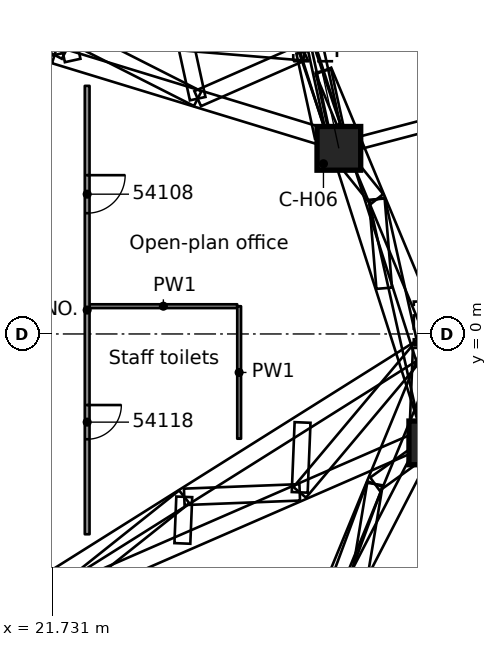
"""IFC4 building model, lengths in metres.
Left out: names, types, materials, properties, quantities, classifications, styles, units other than length and angle.
Written with IfcOpenShell. Run it as: python <this file> out.ifc"""

import sys

from ifc_helpers import new_model, si_unit, direction, frame, frame_2d, origin, origin_2d, place, context, subcontext, project, spatial, rectangle, extrude, element, fill, save


model = new_model("IFC4")
c1 = context("Model", 3, precision=1e-05, world=origin(), true_north=direction((0.0, 1.0)))
c2 = subcontext(c1, "Body", "Model", "MODEL_VIEW")
j1 = project(units=[si_unit("LENGTHUNIT", "METRE"), si_unit("PLANEANGLEUNIT", "RADIAN")], contexts=[c1])
p1 = place(None, origin())
s1 = spatial("IfcSite", under=j1, at=p1, CompositionType="ELEMENT")
p2 = place(p1, origin())
s2 = spatial("IfcBuilding", under=s1, at=p2, CompositionType="ELEMENT")
p3 = place(p2, frame((0.0, 0.0, 271.0)))
s3 = spatial("IfcBuildingStorey", under=s2, at=p3, CompositionType="ELEMENT", Elevation=271.0)
p4 = place(p3, frame((29.274, 4.884, 0.358), z_axis=(-0.132717470137, 0.608789551492, 0.782151746859), x_axis=(-0.977052294388, -0.212999563453, 0.0)))
e1 = element("IfcColumn", 1, at=p4, inside=s3, PredefinedType="COLUMN", context=c2, shape_type="SweptSolid", body=[
    extrude(rectangle(XDim=1.15, YDim=1.15, at=origin_2d()), origin(), (0.0, 0.0, 1.0), 4.709),
])
p5 = place(p3, frame((31.693, -2.866, 0.375), z_axis=(0.026550783802, 0.652520980546, 0.757305371582), x_axis=(-0.999173206851, 0.040655906227, 0.0)))
e2 = element("IfcColumn", 2, at=p5, inside=s3, PredefinedType="COLUMN", context=c2, shape_type="SweptSolid", body=[
    extrude(rectangle(XDim=1.15, YDim=1.15, at=origin_2d()), origin(), (0.0, 0.0, 1.0), 4.818),
])
p6 = place(p3, frame((22.713, 0.731, 0.0), z_axis=(0.0, 0.0, 1.0), x_axis=(1.0, 0.0, 0.0)))
e3 = element("IfcWall", 3, at=p6, inside=s3, PredefinedType="PARTITIONING", context=c2, shape_type="SweptSolid", body=[
    extrude(rectangle(XDim=3.886, YDim=0.1, at=frame_2d((1.943, 0.0))), origin(), (0.0, 0.0, 1.0), 3.98),
])
p7 = place(p3, frame((26.65, -2.756, 0.0), z_axis=(0.0, 0.0, 1.0), x_axis=(0.0, 1.0, 0.0)))
e4 = element("IfcWall", 4, at=p7, inside=s3, PredefinedType="PARTITIONING", context=c2, shape_type="SweptSolid", body=[
    extrude(rectangle(XDim=3.486, YDim=0.1, at=frame_2d((1.743, 0.0))), origin(), (0.0, 0.0, 1.0), 3.98),
])
p8 = place(p3, frame((22.651, 6.528, 0.0), z_axis=(0.0, 0.0, 1.0), x_axis=(0.0, -1.0, 0.0)))
e5 = element("IfcWall", 5, at=p8, inside=s3, PredefinedType="PARTITIONING", context=c2, shape_type="SweptSolid", body=[
    extrude(rectangle(XDim=11.798, YDim=0.125, at=frame_2d((5.899, 0.0))), origin(), (0.0, 0.0, 1.0), 3.98),
])
p9 = place(p8, frame((2.35, 0.0, 0.0)))
e6 = element("IfcOpeningElement", 6, at=p9, cuts=e5, PredefinedType="OPENING", context=c2, shape_type="SweptSolid", body=[
    extrude(rectangle(XDim=1.0, YDim=2.1, at=frame_2d((0.5, 1.05))), frame((0.0, 0.073, 0.0), z_axis=(0.0, -1.0, 0.0), x_axis=(1.0, 0.0, 0.0)), (0.0, 0.0, 1.0), 0.145),
])
p10 = place(p8, frame((8.398, 0.0, 0.0)))
e7 = element("IfcOpeningElement", 7, at=p10, cuts=e5, PredefinedType="OPENING", context=c2, shape_type="SweptSolid", body=[
    extrude(rectangle(XDim=0.9, YDim=2.1, at=frame_2d((0.45, 1.05))), frame((0.0, 0.073, 0.0), z_axis=(0.0, -1.0, 0.0), x_axis=(1.0, 0.0, 0.0)), (0.0, 0.0, 1.0), 0.145),
])
p11 = place(p9, origin())
e8 = element("IfcDoor", 8, at=p11, inside=s3, OperationType="SINGLE_SWING_LEFT", PredefinedType="DOOR", context=c2, shape_type="SweptSolid", body=[
    extrude(rectangle(XDim=1.0, YDim=2.1, at=frame_2d((0.5, 1.05))), frame((0.0, 0.025, 0.0), z_axis=(0.0, -1.0, 0.0), x_axis=(1.0, 0.0, 0.0)), (0.0, 0.0, 1.0), 0.05),
])
fill(e6, e8)
p12 = place(p10, origin())
e9 = element("IfcDoor", 9, at=p12, inside=s3, OperationType="SINGLE_SWING_RIGHT", PredefinedType="DOOR", context=c2, shape_type="SweptSolid", body=[
    extrude(rectangle(XDim=0.9, YDim=2.1, at=frame_2d((0.45, 1.05))), frame((0.0, 0.025, 0.0), z_axis=(0.0, -1.0, 0.0), x_axis=(1.0, 0.0, 0.0)), (0.0, 0.0, 1.0), 0.05),
])
fill(e7, e9)
save(model, sys.argv[1])
